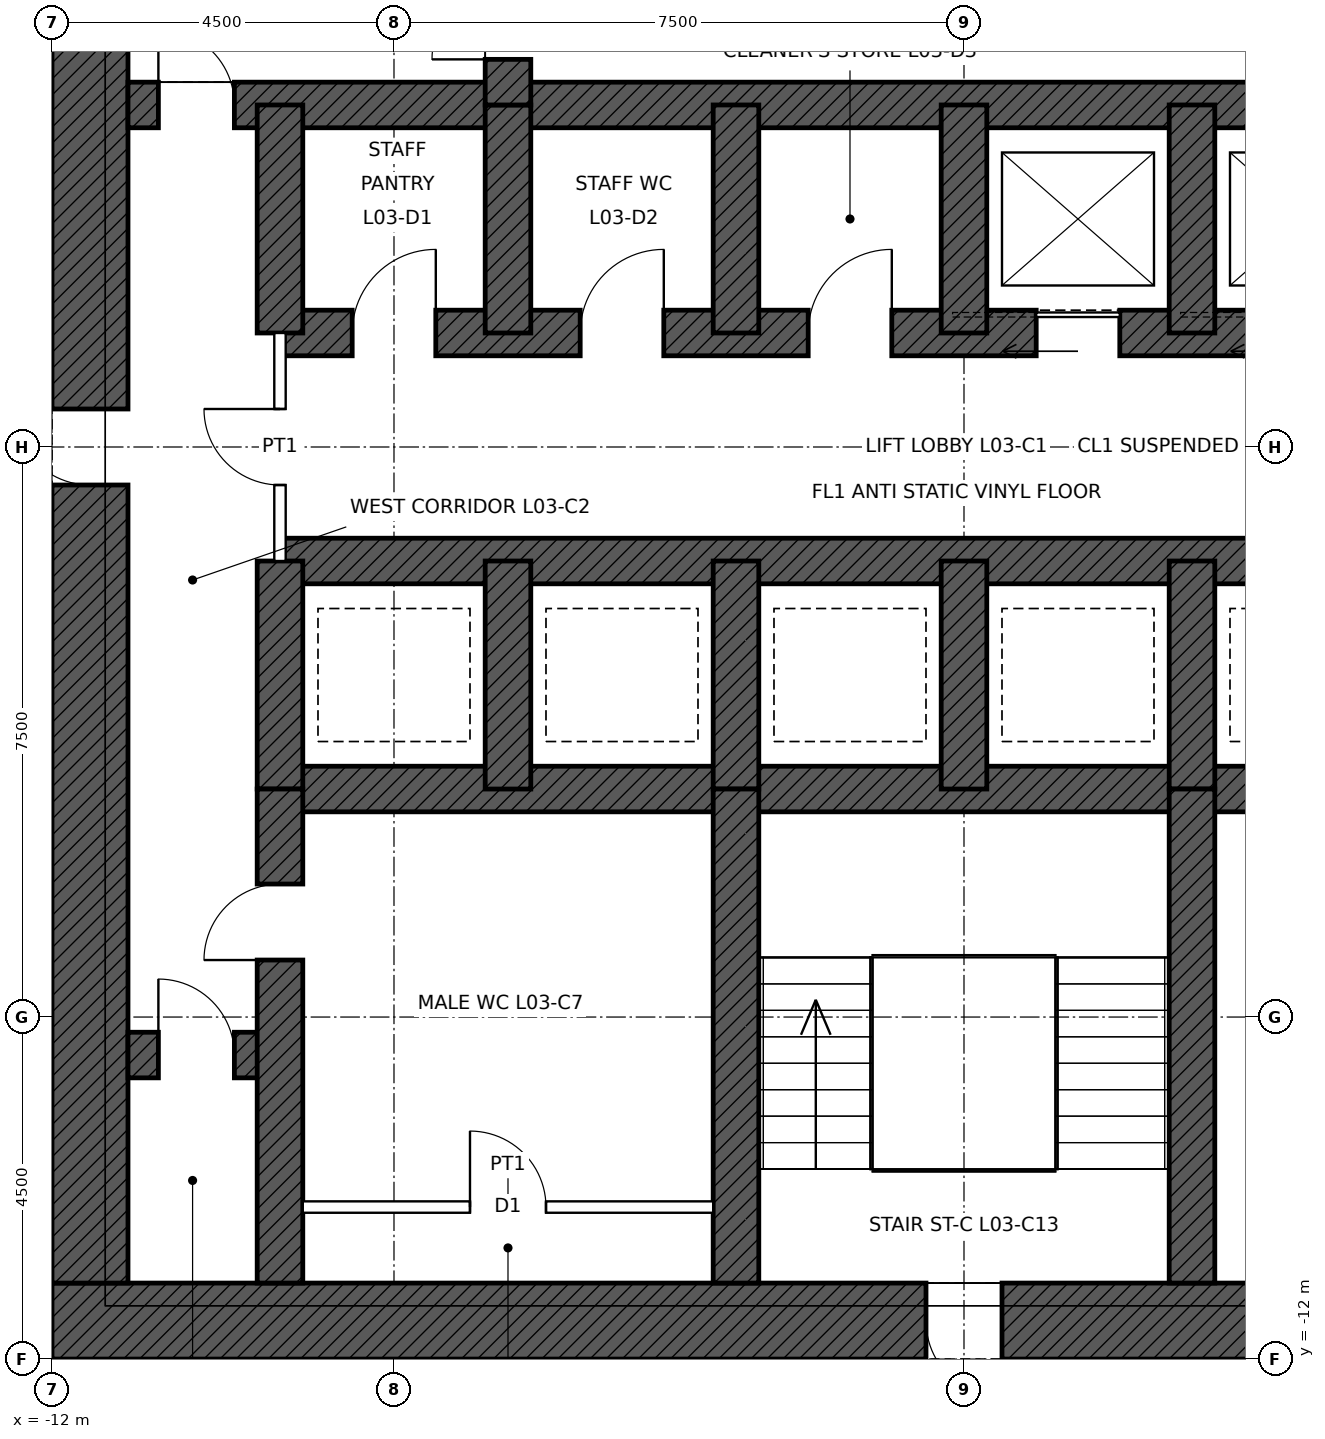
"""IFC4 building model, lengths in metres.
Left out: names, types, materials, properties, quantities, classifications, styles, units other than length and angle.
Written with IfcOpenShell. Run it as: python <this file> out.ifc"""

import sys

from ifc_helpers import new_model, si_unit, direction, frame, frame_2d, origin, place, context, subcontext, project, spatial, rectangle, extrude, element, fill, save


model = new_model("IFC4")
c1 = context("Model", 3, precision=1e-05, world=origin(), true_north=direction((0.0, 1.0)))
c2 = subcontext(c1, "Body", "Model", "MODEL_VIEW")
j1 = project(units=[si_unit("LENGTHUNIT", "METRE"), si_unit("PLANEANGLEUNIT", "RADIAN")], contexts=[c1])
p1 = place(None, origin())
s1 = spatial("IfcSite", under=j1, at=p1, CompositionType="ELEMENT")
p2 = place(p1, origin())
s2 = spatial("IfcBuilding", under=s1, at=p2, CompositionType="ELEMENT")
p3 = place(p2, frame((0.0, 0.0, 18.0)))
s3 = spatial("IfcBuildingStorey", under=s2, at=p3, CompositionType="ELEMENT", Elevation=18.0)
p4 = place(p3, frame((12.0, -11.5, 0.0), z_axis=(0.0, 0.0, 1.0), x_axis=(-1.0, 0.0, 0.0)))
e1 = element("IfcWall", 1, at=p4, inside=s3, PredefinedType="SHEAR", context=c2, shape_type="SweptSolid", body=[
    extrude(rectangle(XDim=24.0, YDim=1.0, at=frame_2d((12.0, 0.0))), origin(), (0.0, 0.0, 1.0), 5.4),
])
p5 = place(p4, frame((11.5, 0.0, 0.0)))
e2 = element("IfcOpeningElement", 2, at=p5, cuts=e1, PredefinedType="OPENING", context=c2, shape_type="SweptSolid", body=[
    extrude(rectangle(XDim=1.0, YDim=2.1, at=frame_2d((0.5, 1.05))), frame((0.0, 0.51, 0.0), z_axis=(0.0, -1.0, 0.0), x_axis=(1.0, 0.0, 0.0)), (0.0, 0.0, 1.0), 1.02),
])
p6 = place(p4, frame((1.0, 0.0, 0.0)))
e3 = element("IfcOpeningElement", 3, at=p6, cuts=e1, PredefinedType="OPENING", context=c2, shape_type="SweptSolid", body=[
    extrude(rectangle(XDim=1.0, YDim=2.4, at=frame_2d((0.5, 1.2))), frame((0.0, 0.51, 0.0), z_axis=(0.0, -1.0, 0.0), x_axis=(1.0, 0.0, 0.0)), (0.0, 0.0, 1.0), 1.02),
])
p7 = place(p3, frame((-11.5, -11.0, 0.0), z_axis=(0.0, 0.0, 1.0), x_axis=(0.0, 1.0, 0.0)))
e4 = element("IfcWall", 4, at=p7, inside=s3, PredefinedType="SHEAR", context=c2, shape_type="SweptSolid", body=[
    extrude(rectangle(XDim=22.0, YDim=1.0, at=frame_2d((11.0, 0.0))), origin(), (0.0, 0.0, 1.0), 5.4),
])
p8 = place(p7, frame((10.5, 0.0, 0.0)))
e5 = element("IfcOpeningElement", 5, at=p8, cuts=e4, PredefinedType="OPENING", context=c2, shape_type="SweptSolid", body=[
    extrude(rectangle(XDim=1.0, YDim=2.4, at=frame_2d((0.5, 1.2))), frame((0.0, 0.51, 0.0), z_axis=(0.0, -1.0, 0.0), x_axis=(1.0, 0.0, 0.0)), (0.0, 0.0, 1.0), 1.02),
])
p9 = place(p3, frame((-11.0, 4.5, 0.0), z_axis=(0.0, 0.0, 1.0), x_axis=(1.0, 0.0, 0.0)))
e6 = element("IfcWall", 6, at=p9, inside=s3, PredefinedType="SHEAR", context=c2, shape_type="SweptSolid", body=[
    extrude(rectangle(XDim=22.0, YDim=0.6, at=frame_2d((11.0, 0.0))), origin(), (0.0, 0.0, 1.0), 5.4),
])
p10 = place(p9, frame((0.4, 0.0, 0.0)))
e7 = element("IfcOpeningElement", 7, at=p10, cuts=e6, PredefinedType="OPENING", context=c2, shape_type="SweptSolid", body=[
    extrude(rectangle(XDim=1.0, YDim=2.1, at=frame_2d((0.5, 1.05))), frame((0.0, 0.31, 0.0), z_axis=(0.0, -1.0, 0.0), x_axis=(1.0, 0.0, 0.0)), (0.0, 0.0, 1.0), 0.62),
])
p11 = place(p9, frame((20.6, 0.0, 0.0)))
e8 = element("IfcOpeningElement", 8, at=p11, cuts=e6, PredefinedType="OPENING", context=c2, shape_type="SweptSolid", body=[
    extrude(rectangle(XDim=1.0, YDim=2.1, at=frame_2d((0.5, 1.05))), frame((0.0, 0.31, 0.0), z_axis=(0.0, -1.0, 0.0), x_axis=(1.0, 0.0, 0.0)), (0.0, 0.0, 1.0), 0.62),
])
p12 = place(p3, frame((-9.0, 1.5, 0.0), z_axis=(0.0, 0.0, 1.0), x_axis=(1.0, 0.0, 0.0)))
e9 = element("IfcWall", 9, at=p12, inside=s3, PredefinedType="SHEAR", context=c2, shape_type="SweptSolid", body=[
    extrude(rectangle(XDim=18.0, YDim=0.6, at=frame_2d((9.0, 0.0))), origin(), (0.0, 0.0, 1.0), 5.4),
])
p13 = place(p12, frame((9.95, 0.0, 0.0)))
e10 = element("IfcOpeningElement", 10, at=p13, cuts=e9, PredefinedType="OPENING", context=c2, shape_type="SweptSolid", body=[
    extrude(rectangle(XDim=1.1, YDim=2.1, at=frame_2d((0.55, 1.05))), frame((0.0, 0.31, 0.0), z_axis=(0.0, -1.0, 0.0), x_axis=(1.0, 0.0, 0.0)), (0.0, 0.0, 1.0), 0.62),
])
p14 = place(p12, frame((12.95, 0.0, 0.0)))
e11 = element("IfcOpeningElement", 11, at=p14, cuts=e9, PredefinedType="OPENING", context=c2, shape_type="SweptSolid", body=[
    extrude(rectangle(XDim=1.1, YDim=2.1, at=frame_2d((0.55, 1.05))), frame((0.0, 0.31, 0.0), z_axis=(0.0, -1.0, 0.0), x_axis=(1.0, 0.0, 0.0)), (0.0, 0.0, 1.0), 0.62),
])
p15 = place(p12, frame((15.95, 0.0, 0.0)))
e12 = element("IfcOpeningElement", 12, at=p15, cuts=e9, PredefinedType="OPENING", context=c2, shape_type="SweptSolid", body=[
    extrude(rectangle(XDim=1.1, YDim=2.1, at=frame_2d((0.55, 1.05))), frame((0.0, 0.31, 0.0), z_axis=(0.0, -1.0, 0.0), x_axis=(1.0, 0.0, 0.0)), (0.0, 0.0, 1.0), 0.62),
])
p16 = place(p12, frame((0.95, 0.0, 0.0)))
e13 = element("IfcOpeningElement", 13, at=p16, cuts=e9, PredefinedType="OPENING", context=c2, shape_type="SweptSolid", body=[
    extrude(rectangle(XDim=1.1, YDim=2.1, at=frame_2d((0.55, 1.05))), frame((0.0, 0.31, 0.0), z_axis=(0.0, -1.0, 0.0), x_axis=(1.0, 0.0, 0.0)), (0.0, 0.0, 1.0), 0.62),
])
p17 = place(p12, frame((3.95, 0.0, 0.0)))
e14 = element("IfcOpeningElement", 14, at=p17, cuts=e9, PredefinedType="OPENING", context=c2, shape_type="SweptSolid", body=[
    extrude(rectangle(XDim=1.1, YDim=2.1, at=frame_2d((0.55, 1.05))), frame((0.0, 0.31, 0.0), z_axis=(0.0, -1.0, 0.0), x_axis=(1.0, 0.0, 0.0)), (0.0, 0.0, 1.0), 0.62),
])
p18 = place(p12, frame((6.95, 0.0, 0.0)))
e15 = element("IfcOpeningElement", 15, at=p18, cuts=e9, PredefinedType="OPENING", context=c2, shape_type="SweptSolid", body=[
    extrude(rectangle(XDim=1.1, YDim=2.1, at=frame_2d((0.55, 1.05))), frame((0.0, 0.31, 0.0), z_axis=(0.0, -1.0, 0.0), x_axis=(1.0, 0.0, 0.0)), (0.0, 0.0, 1.0), 0.62),
])
for number, where, z_axis, x_axis in (
    (16, (-9.0, -1.5, 0.0), (0.0, 0.0, 1.0), (1.0, 0.0, 0.0)),
    (17, (-9.0, -4.5, 0.0), (0.0, 0.0, 1.0), (1.0, 0.0, 0.0)),
):
    element("IfcWall", number, at=place(p3, frame(where, z_axis=z_axis, x_axis=x_axis)), inside=s3, PredefinedType="SHEAR", context=c2, shape_type="SweptSolid", body=[
        extrude(rectangle(XDim=18.0, YDim=0.6, at=frame_2d((9.0, 0.0))), origin(), (0.0, 0.0, 1.0), 5.4),
    ])
p19 = place(p3, frame((-11.0, -8.0, 0.0), z_axis=(0.0, 0.0, 1.0), x_axis=(1.0, 0.0, 0.0)))
e18 = element("IfcWall", 18, at=p19, inside=s3, PredefinedType="SHEAR", context=c2, shape_type="SweptSolid", body=[
    extrude(rectangle(XDim=2.0, YDim=0.6, at=frame_2d((1.0, 0.0))), origin(), (0.0, 0.0, 1.0), 5.4),
])
p20 = place(p19, frame((0.4, 0.0, 0.0)))
e19 = element("IfcOpeningElement", 19, at=p20, cuts=e18, PredefinedType="OPENING", context=c2, shape_type="SweptSolid", body=[
    extrude(rectangle(XDim=1.0, YDim=2.1, at=frame_2d((0.5, 1.05))), frame((0.0, 0.31, 0.0), z_axis=(0.0, -1.0, 0.0), x_axis=(1.0, 0.0, 0.0)), (0.0, 0.0, 1.0), 0.62),
])
for number, where, z_axis, x_axis in (
    (20, (-9.0, 1.5, 0.0), (0.0, 0.0, 1.0), (0.0, 1.0, 0.0)),
    (21, (-9.0, -4.5, 0.0), (0.0, 0.0, 1.0), (0.0, 1.0, 0.0)),
    (22, (-6.0, 1.5, 0.0), (0.0, 0.0, 1.0), (0.0, 1.0, 0.0)),
    (23, (-3.0, 1.5, 0.0), (0.0, 0.0, 1.0), (0.0, 1.0, 0.0)),
    (24, (0.0, 1.5, 0.0), (0.0, 0.0, 1.0), (0.0, 1.0, 0.0)),
    (25, (3.0, 1.5, 0.0), (0.0, 0.0, 1.0), (0.0, 1.0, 0.0)),
    (26, (-6.0, -4.5, 0.0), (0.0, 0.0, 1.0), (0.0, 1.0, 0.0)),
    (27, (-3.0, -4.5, 0.0), (0.0, 0.0, 1.0), (0.0, 1.0, 0.0)),
    (28, (0.0, -4.5, 0.0), (0.0, 0.0, 1.0), (0.0, 1.0, 0.0)),
    (29, (3.0, -4.5, 0.0), (0.0, 0.0, 1.0), (0.0, 1.0, 0.0)),
):
    element("IfcWall", number, at=place(p3, frame(where, z_axis=z_axis, x_axis=x_axis)), inside=s3, PredefinedType="SHEAR", context=c2, shape_type="SweptSolid", body=[
        extrude(rectangle(XDim=3.0, YDim=0.6, at=frame_2d((1.5, 0.0))), origin(), (0.0, 0.0, 1.0), 5.4),
    ])
p21 = place(p3, frame((-6.0, 4.5, 0.0), z_axis=(0.0, 0.0, 1.0), x_axis=(0.0, 1.0, 0.0)))
e30 = element("IfcWall", 30, at=p21, inside=s3, PredefinedType="SHEAR", context=c2, shape_type="SweptSolid", body=[
    extrude(rectangle(XDim=6.5, YDim=0.6, at=frame_2d((3.25, 0.0))), origin(), (0.0, 0.0, 1.0), 5.4),
])
p22 = place(p21, frame((0.6, 0.0, 0.0)))
e31 = element("IfcOpeningElement", 31, at=p22, cuts=e30, PredefinedType="OPENING", context=c2, shape_type="SweptSolid", body=[
    extrude(rectangle(XDim=1.0, YDim=2.1, at=frame_2d((0.5, 1.05))), frame((0.0, 0.31, 0.0), z_axis=(0.0, -1.0, 0.0), x_axis=(1.0, 0.0, 0.0)), (0.0, 0.0, 1.0), 0.62),
])
p23 = place(p3, frame((-9.0, -11.0, 0.0), z_axis=(0.0, 0.0, 1.0), x_axis=(0.0, 1.0, 0.0)))
e32 = element("IfcWall", 32, at=p23, inside=s3, PredefinedType="SHEAR", context=c2, shape_type="SweptSolid", body=[
    extrude(rectangle(XDim=6.5, YDim=0.6, at=frame_2d((3.25, 0.0))), origin(), (0.0, 0.0, 1.0), 5.4),
])
p24 = place(p23, frame((4.25, 0.0, 0.0)))
e33 = element("IfcOpeningElement", 33, at=p24, cuts=e32, PredefinedType="OPENING", context=c2, shape_type="SweptSolid", body=[
    extrude(rectangle(XDim=1.0, YDim=2.1, at=frame_2d((0.5, 1.05))), frame((0.0, 0.31, 0.0), z_axis=(0.0, -1.0, 0.0), x_axis=(1.0, 0.0, 0.0)), (0.0, 0.0, 1.0), 0.62),
])
for number, where, z_axis, x_axis in (
    (34, (-3.0, -11.0, 0.0), (0.0, 0.0, 1.0), (0.0, 1.0, 0.0)),
    (35, (3.0, -11.0, 0.0), (0.0, 0.0, 1.0), (0.0, 1.0, 0.0)),
):
    element("IfcWall", number, at=place(p3, frame(where, z_axis=z_axis, x_axis=x_axis)), inside=s3, PredefinedType="SHEAR", context=c2, shape_type="SweptSolid", body=[
        extrude(rectangle(XDim=6.5, YDim=0.6, at=frame_2d((3.25, 0.0))), origin(), (0.0, 0.0, 1.0), 5.4),
    ])
p25 = place(p3, frame((-8.7, -10.0, 0.0), z_axis=(0.0, 0.0, 1.0), x_axis=(1.0, 0.0, 0.0)))
e36 = element("IfcWall", 36, at=p25, inside=s3, PredefinedType="PARTITIONING", context=c2, shape_type="SweptSolid", body=[
    extrude(rectangle(XDim=5.4, YDim=0.15, at=frame_2d((2.7, 0.0))), origin(), (0.0, 0.0, 1.0), 5.15),
])
p26 = place(p25, frame((2.2, 0.0, 0.0)))
e37 = element("IfcOpeningElement", 37, at=p26, cuts=e36, PredefinedType="OPENING", context=c2, shape_type="SweptSolid", body=[
    extrude(rectangle(XDim=1.0, YDim=2.1, at=frame_2d((0.5, 1.05))), frame((0.0, 0.085, 0.0), z_axis=(0.0, -1.0, 0.0), x_axis=(1.0, 0.0, 0.0)), (0.0, 0.0, 1.0), 0.17),
])
p27 = place(p3, frame((-9.0, -1.5, 0.0), z_axis=(0.0, 0.0, 1.0), x_axis=(0.0, 1.0, 0.0)))
e38 = element("IfcWall", 38, at=p27, inside=s3, PredefinedType="PARTITIONING", context=c2, shape_type="SweptSolid", body=[
    extrude(rectangle(XDim=3.0, YDim=0.15, at=frame_2d((1.5, 0.0))), origin(), (0.0, 0.0, 1.0), 5.15),
])
p28 = place(p27, frame((1.0, 0.0, 0.0)))
e39 = element("IfcOpeningElement", 39, at=p28, cuts=e38, PredefinedType="OPENING", context=c2, shape_type="SweptSolid", body=[
    extrude(rectangle(XDim=1.0, YDim=2.4, at=frame_2d((0.5, 1.2))), frame((0.0, 0.085, 0.0), z_axis=(0.0, -1.0, 0.0), x_axis=(1.0, 0.0, 0.0)), (0.0, 0.0, 1.0), 0.17),
])
p29 = place(p10, origin())
e40 = element("IfcDoor", 40, at=p29, inside=s3, OperationType="SINGLE_SWING_LEFT", PredefinedType="DOOR", context=c2, shape_type="SweptSolid", body=[
    extrude(rectangle(XDim=1.0, YDim=2.1, at=frame_2d((0.5, 1.05))), frame((0.0, 0.025, 0.0), z_axis=(0.0, -1.0, 0.0), x_axis=(1.0, 0.0, 0.0)), (0.0, 0.0, 1.0), 0.05),
])
fill(e7, e40)
p30 = place(p22, origin())
e41 = element("IfcDoor", 41, at=p30, inside=s3, OperationType="SINGLE_SWING_LEFT", PredefinedType="DOOR", context=c2, shape_type="SweptSolid", body=[
    extrude(rectangle(XDim=1.0, YDim=2.1, at=frame_2d((0.5, 1.05))), frame((0.0, 0.025, 0.0), z_axis=(0.0, -1.0, 0.0), x_axis=(1.0, 0.0, 0.0)), (0.0, 0.0, 1.0), 0.05),
])
fill(e31, e41)
p31 = place(p5, origin())
e42 = element("IfcDoor", 42, at=p31, inside=s3, OperationType="SINGLE_SWING_LEFT", PredefinedType="DOOR", context=c2, shape_type="SweptSolid", body=[
    extrude(rectangle(XDim=1.0, YDim=2.1, at=frame_2d((0.5, 1.05))), frame((0.0, 0.485, 0.0), z_axis=(0.0, -1.0, 0.0), x_axis=(1.0, 0.0, 0.0)), (0.0, 0.0, 1.0), 0.05),
])
fill(e2, e42)
p32 = place(p8, origin())
e43 = element("IfcDoor", 43, at=p32, inside=s3, OperationType="SINGLE_SWING_RIGHT", PredefinedType="DOOR", context=c2, shape_type="SweptSolid", body=[
    extrude(rectangle(XDim=1.0, YDim=2.4, at=frame_2d((0.5, 1.2))), frame((0.0, 0.485, 0.0), z_axis=(0.0, -1.0, 0.0), x_axis=(1.0, 0.0, 0.0)), (0.0, 0.0, 1.0), 0.05),
])
fill(e5, e43)
p33 = place(p24, origin())
e44 = element("IfcDoor", 44, at=p33, inside=s3, OperationType="SINGLE_SWING_LEFT", PredefinedType="DOOR", context=c2, shape_type="SweptSolid", body=[
    extrude(rectangle(XDim=1.0, YDim=2.1, at=frame_2d((0.5, 1.05))), frame((0.0, 0.025, 0.0), z_axis=(0.0, -1.0, 0.0), x_axis=(1.0, 0.0, 0.0)), (0.0, 0.0, 1.0), 0.05),
])
fill(e33, e44)
p34 = place(p20, origin())
e45 = element("IfcDoor", 45, at=p34, inside=s3, OperationType="SINGLE_SWING_LEFT", PredefinedType="DOOR", context=c2, shape_type="SweptSolid", body=[
    extrude(rectangle(XDim=1.0, YDim=2.1, at=frame_2d((0.5, 1.05))), frame((0.0, 0.025, 0.0), z_axis=(0.0, -1.0, 0.0), x_axis=(1.0, 0.0, 0.0)), (0.0, 0.0, 1.0), 0.05),
])
fill(e19, e45)
p35 = place(p13, origin())
e46 = element("IfcDoor", 46, at=p35, inside=s3, OperationType="SLIDING_TO_LEFT", PredefinedType="DOOR", context=c2, shape_type="SweptSolid", body=[
    extrude(rectangle(XDim=1.1, YDim=2.1, at=frame_2d((0.55, 1.05))), frame((0.0, 0.025, 0.0), z_axis=(0.0, -1.0, 0.0), x_axis=(1.0, 0.0, 0.0)), (0.0, 0.0, 1.0), 0.05),
])
fill(e10, e46)
p36 = place(p26, origin())
e47 = element("IfcDoor", 47, at=p36, inside=s3, OperationType="SINGLE_SWING_LEFT", PredefinedType="DOOR", context=c2, shape_type="SweptSolid", body=[
    extrude(rectangle(XDim=1.0, YDim=2.1, at=frame_2d((0.5, 1.05))), frame((0.0, 0.025, 0.0), z_axis=(0.0, -1.0, 0.0), x_axis=(1.0, 0.0, 0.0)), (0.0, 0.0, 1.0), 0.05),
])
fill(e37, e47)
p37 = place(p28, origin())
e48 = element("IfcDoor", 48, at=p37, inside=s3, OperationType="SINGLE_SWING_RIGHT", PredefinedType="DOOR", context=c2, shape_type="SweptSolid", body=[
    extrude(rectangle(XDim=1.0, YDim=2.4, at=frame_2d((0.5, 1.2))), frame((0.0, 0.025, 0.0), z_axis=(0.0, -1.0, 0.0), x_axis=(1.0, 0.0, 0.0)), (0.0, 0.0, 1.0), 0.05),
])
fill(e39, e48)
p38 = place(p16, origin())
e49 = element("IfcDoor", 49, at=p38, inside=s3, OperationType="SINGLE_SWING_RIGHT", PredefinedType="DOOR", context=c2, shape_type="SweptSolid", body=[
    extrude(rectangle(XDim=1.1, YDim=2.1, at=frame_2d((0.55, 1.05))), frame((0.0, 0.025, 0.0), z_axis=(0.0, -1.0, 0.0), x_axis=(1.0, 0.0, 0.0)), (0.0, 0.0, 1.0), 0.05),
])
fill(e13, e49)
p39 = place(p17, origin())
e50 = element("IfcDoor", 50, at=p39, inside=s3, OperationType="SINGLE_SWING_RIGHT", PredefinedType="DOOR", context=c2, shape_type="SweptSolid", body=[
    extrude(rectangle(XDim=1.1, YDim=2.1, at=frame_2d((0.55, 1.05))), frame((0.0, 0.025, 0.0), z_axis=(0.0, -1.0, 0.0), x_axis=(1.0, 0.0, 0.0)), (0.0, 0.0, 1.0), 0.05),
])
fill(e14, e50)
p40 = place(p18, origin())
e51 = element("IfcDoor", 51, at=p40, inside=s3, OperationType="SINGLE_SWING_RIGHT", PredefinedType="DOOR", context=c2, shape_type="SweptSolid", body=[
    extrude(rectangle(XDim=1.1, YDim=2.1, at=frame_2d((0.55, 1.05))), frame((0.0, 0.025, 0.0), z_axis=(0.0, -1.0, 0.0), x_axis=(1.0, 0.0, 0.0)), (0.0, 0.0, 1.0), 0.05),
])
fill(e15, e51)
save(model, sys.argv[1])
